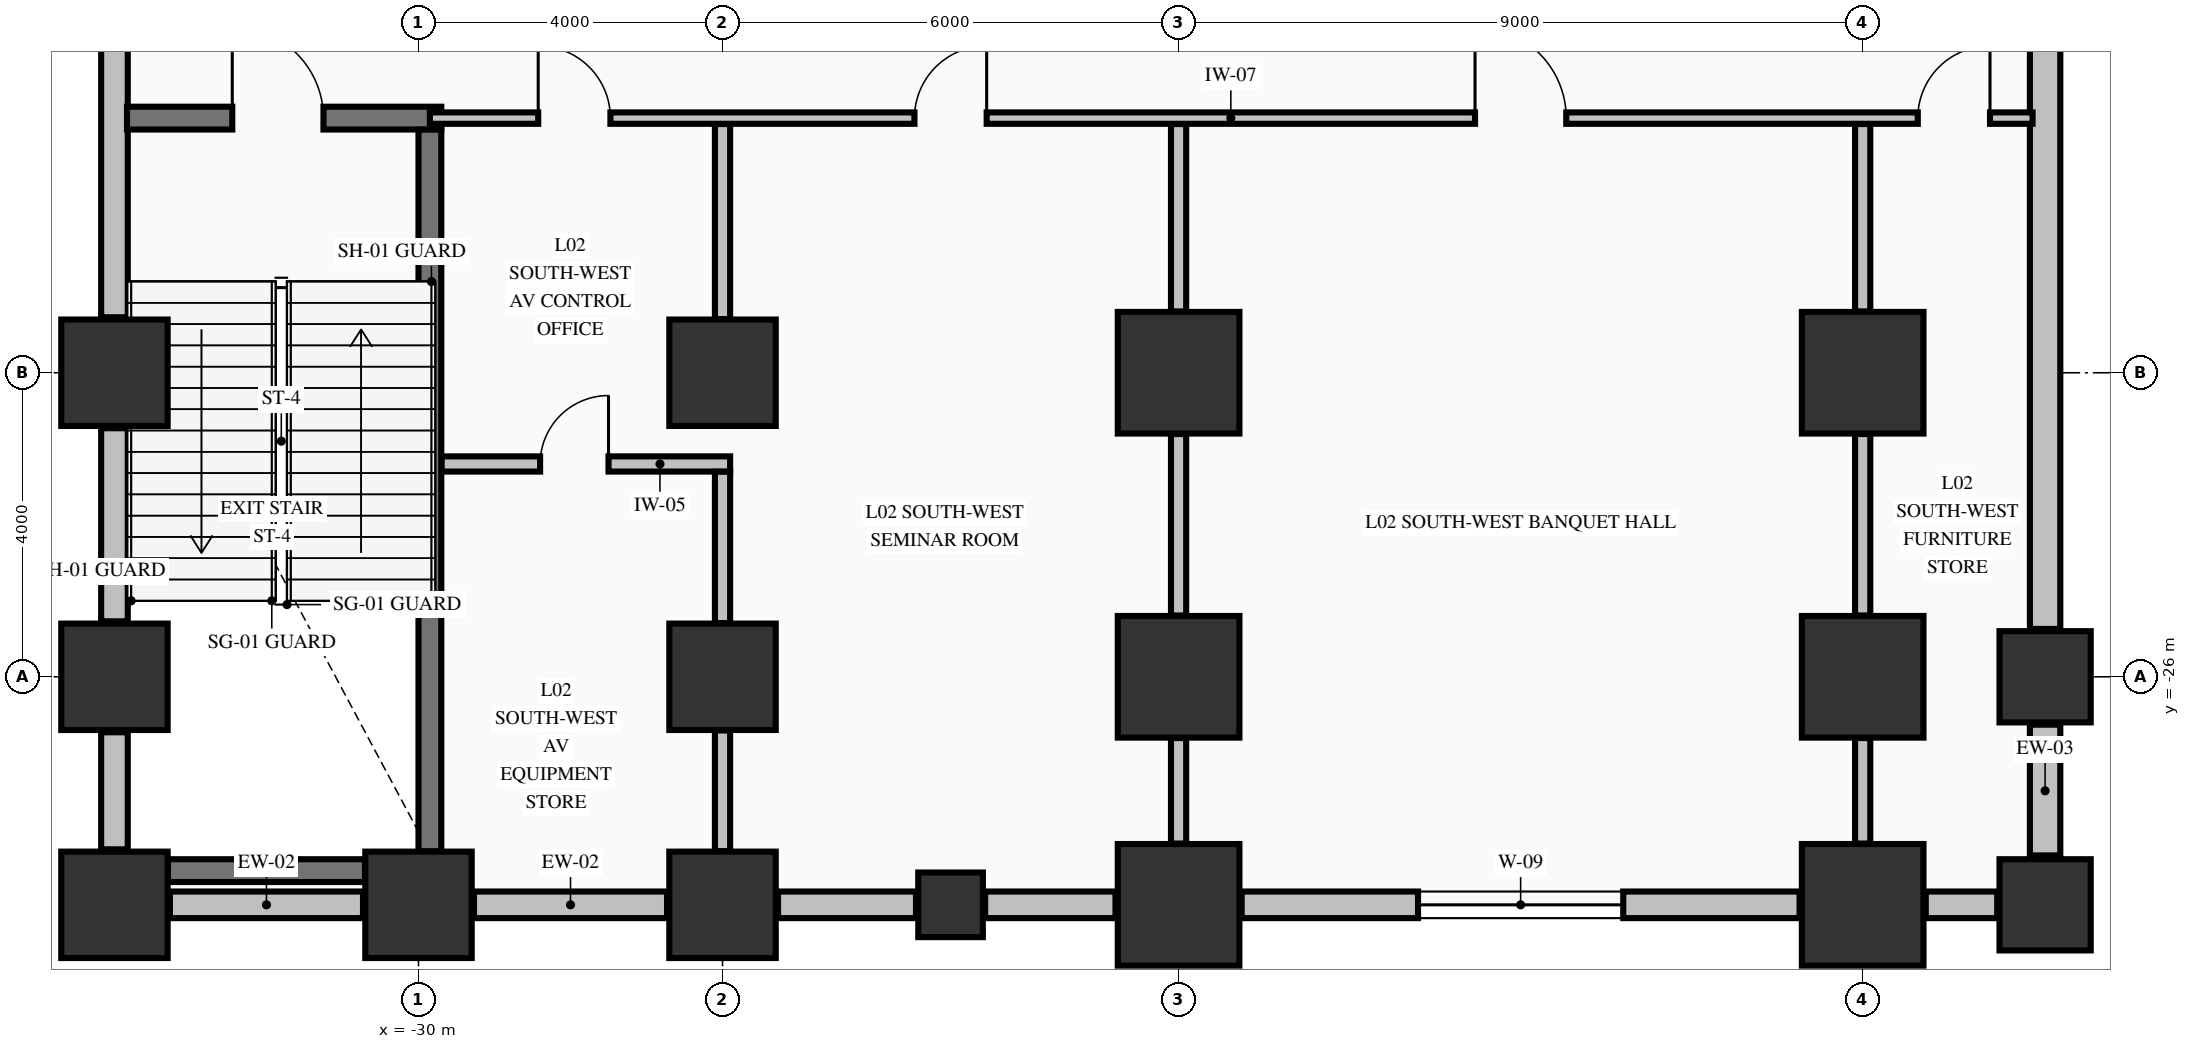
"""IFC4 building model, lengths in metres.
Left out: names, types, materials, properties, quantities, classifications, styles, units other than length and angle.
Written with IfcOpenShell. Run it as: python <this file> out.ifc"""

import sys

from ifc_helpers import new_model, si_unit, direction, frame, frame_2d, origin, origin_2d, place, context, subcontext, project, spatial, rectangle, extrude, element, fill, save


model = new_model("IFC4")
c1 = context("Model", 3, precision=1e-05, world=origin(), true_north=direction((0.0, 1.0)))
c2 = subcontext(c1, "Body", "Model", "MODEL_VIEW")
j1 = project(units=[si_unit("LENGTHUNIT", "METRE"), si_unit("PLANEANGLEUNIT", "RADIAN")], contexts=[c1])
p1 = place(None, origin())
s1 = spatial("IfcSite", under=j1, at=p1, CompositionType="ELEMENT")
p2 = place(p1, origin())
s2 = spatial("IfcBuilding", under=s1, at=p2, CompositionType="ELEMENT")
p3 = place(p2, frame((0.0, 0.0, 10.88)))
s3 = spatial("IfcBuildingStorey", under=s2, at=p3, CompositionType="ELEMENT", Elevation=10.88)
for number, where, z_axis, x_axis in (
    (1, (-34.0, -29.0, 0.0), (0.0, 0.0, 1.0), (1.0, 0.0, 0.0)),
    (2, (-34.0, -26.0, 0.0), (0.0, 0.0, 1.0), (1.0, 0.0, 0.0)),
    (3, (-34.0, -22.0, 0.0), (0.0, 0.0, 1.0), (1.0, 0.0, 0.0)),
    (4, (-30.0, -29.0, 0.0), (0.0, 0.0, 1.0), (1.0, 0.0, 0.0)),
    (5, (-26.0, -29.0, 0.0), (0.0, 0.0, 1.0), (1.0, 0.0, 0.0)),
    (6, (-26.0, -26.0, 0.0), (0.0, 0.0, 1.0), (1.0, 0.0, 0.0)),
    (7, (-26.0, -22.0, 0.0), (0.0, 0.0, 1.0), (1.0, 0.0, 0.0)),
):
    element("IfcColumn", number, at=place(p3, frame(where, z_axis=z_axis, x_axis=x_axis)), inside=s3, PredefinedType="COLUMN", context=c2, shape_type="SweptSolid", body=[
        extrude(rectangle(XDim=1.4, YDim=1.4, at=origin_2d()), origin(), (0.0, 0.0, 1.0), 5.09),
    ])
for number, where, z_axis, x_axis in (
    (8, (-20.0, -29.0, 0.0), (0.0, 0.0, 1.0), (1.0, 0.0, 0.0)),
    (9, (-20.0, -26.0, 0.0), (0.0, 0.0, 1.0), (1.0, 0.0, 0.0)),
    (10, (-20.0, -22.0, 0.0), (0.0, 0.0, 1.0), (1.0, 0.0, 0.0)),
    (11, (-11.0, -29.0, 0.0), (0.0, 0.0, 1.0), (1.0, 0.0, 0.0)),
    (12, (-11.0, -26.0, 0.0), (0.0, 0.0, 1.0), (1.0, 0.0, 0.0)),
    (13, (-11.0, -22.0, 0.0), (0.0, 0.0, 1.0), (1.0, 0.0, 0.0)),
):
    element("IfcColumn", number, at=place(p3, frame(where, z_axis=z_axis, x_axis=x_axis)), inside=s3, PredefinedType="COLUMN", context=c2, shape_type="SweptSolid", body=[
        extrude(rectangle(XDim=1.6, YDim=1.6, at=origin_2d()), origin(), (0.0, 0.0, 1.0), 5.09),
    ])
for number, where, z_axis, x_axis in (
    (14, (-8.6, -29.0, 0.0), (0.0, 0.0, 1.0), (1.0, 0.0, 0.0)),
    (15, (-8.6, -26.0, 0.0), (0.0, 0.0, 1.0), (1.0, 0.0, 0.0)),
):
    element("IfcColumn", number, at=place(p3, frame(where, z_axis=z_axis, x_axis=x_axis)), inside=s3, PredefinedType="COLUMN", context=c2, shape_type="SweptSolid", body=[
        extrude(rectangle(XDim=1.2, YDim=1.2, at=origin_2d()), origin(), (0.0, 0.0, 1.0), 5.09),
    ])
p4 = place(p3, frame((-23.0, -29.0, 0.0), z_axis=(0.0, 0.0, 1.0), x_axis=(1.0, 0.0, 0.0)))
e16 = element("IfcColumn", 16, at=p4, inside=s3, PredefinedType="PILASTER", context=c2, shape_type="SweptSolid", body=[
    extrude(rectangle(XDim=0.85, YDim=0.85, at=origin_2d()), origin(), (0.0, 0.0, 1.0), 5.09),
])
for number, where, z_axis, x_axis in (
    (17, (-33.27, -29.0, 0.0), (0.0, 0.0, 1.0), (1.0, 0.0, 0.0)),
    (18, (-29.27, -29.0, 0.0), (0.0, 0.0, 1.0), (1.0, 0.0, 0.0)),
):
    element("IfcWall", number, at=place(p3, frame(where, z_axis=z_axis, x_axis=x_axis)), inside=s3, PredefinedType="STANDARD", context=c2, shape_type="SweptSolid", body=[
        extrude(rectangle(XDim=2.54, YDim=0.35, at=frame_2d((1.27, 0.0))), origin(), (0.0, 0.0, 1.0), 4.482),
    ])
p5 = place(p3, frame((-25.27, -29.0, 0.0), z_axis=(0.0, 0.0, 1.0), x_axis=(1.0, 0.0, 0.0)))
e19 = element("IfcWall", 19, at=p5, inside=s3, PredefinedType="STANDARD", context=c2, shape_type="SweptSolid", body=[
    extrude(rectangle(XDim=1.815, YDim=0.35, at=frame_2d((0.907, 0.0))), origin(), (0.0, 0.0, 1.0), 4.482),
])
p6 = place(p3, frame((-22.545, -29.0, 0.0), z_axis=(0.0, 0.0, 1.0), x_axis=(1.0, 0.0, 0.0)))
e20 = element("IfcWall", 20, at=p6, inside=s3, PredefinedType="STANDARD", context=c2, shape_type="SweptSolid", body=[
    extrude(rectangle(XDim=1.715, YDim=0.35, at=frame_2d((0.857, 0.0))), origin(), (0.0, 0.0, 1.0), 4.482),
])
p7 = place(p3, frame((-19.17, -29.0, 0.0), z_axis=(0.0, 0.0, 1.0), x_axis=(1.0, 0.0, 0.0)))
e21 = element("IfcWall", 21, at=p7, inside=s3, PredefinedType="STANDARD", context=c2, shape_type="SweptSolid", body=[
    extrude(rectangle(XDim=7.34, YDim=0.35, at=frame_2d((3.67, 0.0))), origin(), (0.0, 0.0, 1.0), 4.482),
])
p8 = place(p7, frame((2.32, 0.0, 0.85)))
e22 = element("IfcOpeningElement", 22, at=p8, cuts=e21, PredefinedType="OPENING", context=c2, shape_type="SweptSolid", body=[
    extrude(rectangle(XDim=2.7, YDim=2.05, at=frame_2d((1.35, 1.025))), frame((0.0, 0.185, 0.0), z_axis=(0.0, -1.0, 0.0), x_axis=(1.0, 0.0, 0.0)), (0.0, 0.0, 1.0), 0.37),
])
p9 = place(p3, frame((-10.17, -29.0, 0.0), z_axis=(0.0, 0.0, 1.0), x_axis=(1.0, 0.0, 0.0)))
e23 = element("IfcWall", 23, at=p9, inside=s3, PredefinedType="STANDARD", context=c2, shape_type="SweptSolid", body=[
    extrude(rectangle(XDim=0.94, YDim=0.35, at=frame_2d((0.47, 0.0))), origin(), (0.0, 0.0, 1.0), 4.482),
])
p10 = place(p3, frame((-34.0, -28.27, 0.0), z_axis=(0.0, 0.0, 1.0), x_axis=(0.0, 1.0, 0.0)))
e24 = element("IfcWall", 24, at=p10, inside=s3, PredefinedType="STANDARD", context=c2, shape_type="SweptSolid", body=[
    extrude(rectangle(XDim=1.54, YDim=0.35, at=frame_2d((0.77, 0.0))), origin(), (0.0, 0.0, 1.0), 5.09),
])
p11 = place(p3, frame((-34.0, -25.27, 0.0), z_axis=(0.0, 0.0, 1.0), x_axis=(0.0, 1.0, 0.0)))
e25 = element("IfcWall", 25, at=p11, inside=s3, PredefinedType="STANDARD", context=c2, shape_type="SweptSolid", body=[
    extrude(rectangle(XDim=2.54, YDim=0.35, at=frame_2d((1.27, 0.0))), origin(), (0.0, 0.0, 1.0), 5.09),
])
p12 = place(p3, frame((-34.0, -21.27, 0.0), z_axis=(0.0, 0.0, 1.0), x_axis=(0.0, 1.0, 0.0)))
e26 = element("IfcWall", 26, at=p12, inside=s3, PredefinedType="STANDARD", context=c2, shape_type="SweptSolid", body=[
    extrude(rectangle(XDim=4.54, YDim=0.35, at=frame_2d((2.27, 0.0))), origin(), (0.0, 0.0, 1.0), 5.09),
])
p13 = place(p3, frame((-8.6, -28.35, 0.0), z_axis=(0.0, 0.0, 1.0), x_axis=(0.0, 1.0, 0.0)))
e27 = element("IfcWall", 27, at=p13, inside=s3, PredefinedType="STANDARD", context=c2, shape_type="SweptSolid", body=[
    extrude(rectangle(XDim=1.72, YDim=0.4, at=frame_2d((0.86, 0.0))), origin(), (0.0, 0.0, 1.0), 4.132),
])
p14 = place(p3, frame((-8.6, -25.37, 0.0), z_axis=(0.0, 0.0, 1.0), x_axis=(0.0, 1.0, 0.0)))
e28 = element("IfcWall", 28, at=p14, inside=s3, PredefinedType="STANDARD", context=c2, shape_type="SweptSolid", body=[
    extrude(rectangle(XDim=24.72, YDim=0.4, at=frame_2d((12.36, 0.0))), origin(), (0.0, 0.0, 1.0), 4.132),
])
p15 = place(p3, frame((-33.296, -28.55, 0.0), z_axis=(0.0, 0.0, 1.0), x_axis=(1.0, 0.0, 0.0)))
e29 = element("IfcWall", 29, at=p15, inside=s3, PredefinedType="SHEAR", context=c2, shape_type="SweptSolid", body=[
    extrude(rectangle(XDim=2.592, YDim=0.3, at=frame_2d((1.296, 0.0))), origin(), (0.0, 0.0, 1.0), 5.09),
])
p16 = place(p3, frame((-33.835, -18.65, 0.0), z_axis=(0.0, 0.0, 1.0), x_axis=(1.0, 0.0, 0.0)))
e30 = element("IfcWall", 30, at=p16, inside=s3, PredefinedType="SHEAR", context=c2, shape_type="SweptSolid", body=[
    extrude(rectangle(XDim=4.135, YDim=0.3, at=frame_2d((2.067, 0.0))), origin(), (0.0, 0.0, 1.0), 5.09),
])
p17 = place(p16, frame((1.385, 0.0, 0.0)))
e31 = element("IfcOpeningElement", 31, at=p17, cuts=e30, PredefinedType="OPENING", context=c2, shape_type="SweptSolid", body=[
    extrude(rectangle(XDim=1.2, YDim=2.15, at=frame_2d((0.6, 1.075))), frame((0.0, 0.16, 0.0), z_axis=(0.0, -1.0, 0.0), x_axis=(1.0, 0.0, 0.0)), (0.0, 0.0, 1.0), 0.32),
])
p18 = place(p3, frame((-29.697, -23.2, 0.0), z_axis=(0.0, 0.0, 1.0), x_axis=(1.0, 0.0, 0.0)))
e32 = element("IfcWall", 32, at=p18, inside=s3, PredefinedType="PARTITIONING", context=c2, shape_type="SweptSolid", body=[
    extrude(rectangle(XDim=3.797, YDim=0.2, at=frame_2d((1.898, 0.0))), origin(), (0.0, 0.0, 1.0), 5.09),
])
p19 = place(p18, frame((1.297, 0.0, 0.0)))
e33 = element("IfcOpeningElement", 33, at=p19, cuts=e32, PredefinedType="OPENING", context=c2, shape_type="SweptSolid", body=[
    extrude(rectangle(XDim=0.9, YDim=2.15, at=frame_2d((0.45, 1.075))), frame((0.0, 0.11, 0.0), z_axis=(0.0, -1.0, 0.0), x_axis=(1.0, 0.0, 0.0)), (0.0, 0.0, 1.0), 0.22),
])
p20 = place(p3, frame((-29.85, -18.65, 0.0), z_axis=(0.0, 0.0, 1.0), x_axis=(1.0, 0.0, 0.0)))
e34 = element("IfcWall", 34, at=p20, inside=s3, PredefinedType="PARTITIONING", context=c2, shape_type="SweptSolid", body=[
    extrude(rectangle(XDim=21.085, YDim=0.15, at=frame_2d((10.542, 0.0))), origin(), (0.0, 0.0, 1.0), 5.09),
])
p21 = place(p20, frame((1.425, 0.0, 0.0)))
e35 = element("IfcOpeningElement", 35, at=p21, cuts=e34, PredefinedType="OPENING", context=c2, shape_type="SweptSolid", body=[
    extrude(rectangle(XDim=0.95, YDim=2.15, at=frame_2d((0.475, 1.075))), frame((0.0, 0.085, 0.0), z_axis=(0.0, -1.0, 0.0), x_axis=(1.0, 0.0, 0.0)), (0.0, 0.0, 1.0), 0.17),
])
p22 = place(p20, frame((6.375, 0.0, 0.0)))
e36 = element("IfcOpeningElement", 36, at=p22, cuts=e34, PredefinedType="OPENING", context=c2, shape_type="SweptSolid", body=[
    extrude(rectangle(XDim=0.95, YDim=2.15, at=frame_2d((0.475, 1.075))), frame((0.0, 0.085, 0.0), z_axis=(0.0, -1.0, 0.0), x_axis=(1.0, 0.0, 0.0)), (0.0, 0.0, 1.0), 0.17),
])
p23 = place(p20, frame((13.75, 0.0, 0.0)))
e37 = element("IfcOpeningElement", 37, at=p23, cuts=e34, PredefinedType="OPENING", context=c2, shape_type="SweptSolid", body=[
    extrude(rectangle(XDim=1.2, YDim=2.15, at=frame_2d((0.6, 1.075))), frame((0.0, 0.085, 0.0), z_axis=(0.0, -1.0, 0.0), x_axis=(1.0, 0.0, 0.0)), (0.0, 0.0, 1.0), 0.17),
])
p24 = place(p20, frame((19.575, 0.0, 0.0)))
e38 = element("IfcOpeningElement", 38, at=p24, cuts=e34, PredefinedType="OPENING", context=c2, shape_type="SweptSolid", body=[
    extrude(rectangle(XDim=0.95, YDim=2.15, at=frame_2d((0.475, 1.075))), frame((0.0, 0.085, 0.0), z_axis=(0.0, -1.0, 0.0), x_axis=(1.0, 0.0, 0.0)), (0.0, 0.0, 1.0), 0.17),
])
p25 = place(p3, frame((-29.85, -28.296, 0.0), z_axis=(0.0, 0.0, 1.0), x_axis=(0.0, 1.0, 0.0)))
e39 = element("IfcWall", 39, at=p25, inside=s3, PredefinedType="SHEAR", context=c2, shape_type="SweptSolid", body=[
    extrude(rectangle(XDim=9.494, YDim=0.3, at=frame_2d((4.747, 0.0))), origin(), (0.0, 0.0, 1.0), 5.09),
])
p26 = place(p3, frame((-26.0, -28.294, 0.0), z_axis=(0.0, 0.0, 1.0), x_axis=(0.0, 1.0, 0.0)))
e40 = element("IfcWall", 40, at=p26, inside=s3, PredefinedType="PARTITIONING", context=c2, shape_type="SweptSolid", body=[
    extrude(rectangle(XDim=1.588, YDim=0.2, at=frame_2d((0.794, 0.0))), origin(), (0.0, 0.0, 1.0), 4.132),
])
p27 = place(p3, frame((-26.0, -25.294, 0.0), z_axis=(0.0, 0.0, 1.0), x_axis=(0.0, 1.0, 0.0)))
e41 = element("IfcWall", 41, at=p27, inside=s3, PredefinedType="PARTITIONING", context=c2, shape_type="SweptSolid", body=[
    extrude(rectangle(XDim=1.991, YDim=0.2, at=frame_2d((0.996, 0.0))), origin(), (0.0, 0.0, 1.0), 4.132),
])
p28 = place(p3, frame((-26.0, -21.294, 0.0), z_axis=(0.0, 0.0, 1.0), x_axis=(0.0, 1.0, 0.0)))
e42 = element("IfcWall", 42, at=p28, inside=s3, PredefinedType="PARTITIONING", context=c2, shape_type="SweptSolid", body=[
    extrude(rectangle(XDim=2.566, YDim=0.2, at=frame_2d((1.283, 0.0))), origin(), (0.0, 0.0, 1.0), 4.132),
])
p29 = place(p3, frame((-20.0, -28.194, 0.0), z_axis=(0.0, 0.0, 1.0), x_axis=(0.0, 1.0, 0.0)))
e43 = element("IfcWall", 43, at=p29, inside=s3, PredefinedType="PARTITIONING", context=c2, shape_type="SweptSolid", body=[
    extrude(rectangle(XDim=1.388, YDim=0.2, at=frame_2d((0.694, 0.0))), origin(), (0.0, 0.0, 1.0), 4.132),
])
p30 = place(p3, frame((-20.0, -25.194, 0.0), z_axis=(0.0, 0.0, 1.0), x_axis=(0.0, 1.0, 0.0)))
e44 = element("IfcWall", 44, at=p30, inside=s3, PredefinedType="PARTITIONING", context=c2, shape_type="SweptSolid", body=[
    extrude(rectangle(XDim=2.388, YDim=0.2, at=frame_2d((1.194, 0.0))), origin(), (0.0, 0.0, 1.0), 4.132),
])
p31 = place(p3, frame((-20.0, -21.194, 0.0), z_axis=(0.0, 0.0, 1.0), x_axis=(0.0, 1.0, 0.0)))
e45 = element("IfcWall", 45, at=p31, inside=s3, PredefinedType="PARTITIONING", context=c2, shape_type="SweptSolid", body=[
    extrude(rectangle(XDim=2.466, YDim=0.2, at=frame_2d((1.233, 0.0))), origin(), (0.0, 0.0, 1.0), 4.132),
])
p32 = place(p3, frame((-11.0, -28.194, 0.0), z_axis=(0.0, 0.0, 1.0), x_axis=(0.0, 1.0, 0.0)))
e46 = element("IfcWall", 46, at=p32, inside=s3, PredefinedType="PARTITIONING", context=c2, shape_type="SweptSolid", body=[
    extrude(rectangle(XDim=1.388, YDim=0.2, at=frame_2d((0.694, 0.0))), origin(), (0.0, 0.0, 1.0), 4.132),
])
p33 = place(p3, frame((-11.0, -25.194, 0.0), z_axis=(0.0, 0.0, 1.0), x_axis=(0.0, 1.0, 0.0)))
e47 = element("IfcWall", 47, at=p33, inside=s3, PredefinedType="PARTITIONING", context=c2, shape_type="SweptSolid", body=[
    extrude(rectangle(XDim=2.388, YDim=0.2, at=frame_2d((1.194, 0.0))), origin(), (0.0, 0.0, 1.0), 4.132),
])
p34 = place(p3, frame((-11.0, -21.194, 0.0), z_axis=(0.0, 0.0, 1.0), x_axis=(0.0, 1.0, 0.0)))
e48 = element("IfcWall", 48, at=p34, inside=s3, PredefinedType="PARTITIONING", context=c2, shape_type="SweptSolid", body=[
    extrude(rectangle(XDim=2.466, YDim=0.2, at=frame_2d((1.233, 0.0))), origin(), (0.0, 0.0, 1.0), 4.132),
])
p35 = place(p8, origin())
e49 = element("IfcWindow", 49, at=p35, inside=s3, PartitioningType="SINGLE_PANEL", PredefinedType="WINDOW", context=c2, shape_type="SweptSolid", body=[
    extrude(rectangle(XDim=2.7, YDim=2.05, at=frame_2d((1.35, 1.025))), frame((0.0, 0.03, 0.0), z_axis=(0.0, -1.0, 0.0), x_axis=(1.0, 0.0, 0.0)), (0.0, 0.0, 1.0), 0.06),
])
fill(e22, e49)
p36 = place(p17, origin())
e50 = element("IfcDoor", 50, at=p36, inside=s3, OperationType="SINGLE_SWING_LEFT", PredefinedType="DOOR", context=c2, shape_type="SweptSolid", body=[
    extrude(rectangle(XDim=1.2, YDim=2.15, at=frame_2d((0.6, 1.075))), frame((0.0, 0.025, 0.0), z_axis=(0.0, -1.0, 0.0), x_axis=(1.0, 0.0, 0.0)), (0.0, 0.0, 1.0), 0.05),
])
fill(e31, e50)
p37 = place(p19, origin())
e51 = element("IfcDoor", 51, at=p37, inside=s3, OperationType="SINGLE_SWING_RIGHT", PredefinedType="DOOR", context=c2, shape_type="SweptSolid", body=[
    extrude(rectangle(XDim=0.9, YDim=2.15, at=frame_2d((0.45, 1.075))), frame((0.0, 0.025, 0.0), z_axis=(0.0, -1.0, 0.0), x_axis=(1.0, 0.0, 0.0)), (0.0, 0.0, 1.0), 0.05),
])
fill(e33, e51)
p38 = place(p21, origin())
e52 = element("IfcDoor", 52, at=p38, inside=s3, OperationType="SINGLE_SWING_LEFT", PredefinedType="DOOR", context=c2, shape_type="SweptSolid", body=[
    extrude(rectangle(XDim=0.95, YDim=2.15, at=frame_2d((0.475, 1.075))), frame((0.0, 0.025, 0.0), z_axis=(0.0, -1.0, 0.0), x_axis=(1.0, 0.0, 0.0)), (0.0, 0.0, 1.0), 0.05),
])
fill(e35, e52)
p39 = place(p22, origin())
e53 = element("IfcDoor", 53, at=p39, inside=s3, OperationType="SINGLE_SWING_RIGHT", PredefinedType="DOOR", context=c2, shape_type="SweptSolid", body=[
    extrude(rectangle(XDim=0.95, YDim=2.15, at=frame_2d((0.475, 1.075))), frame((0.0, 0.025, 0.0), z_axis=(0.0, -1.0, 0.0), x_axis=(1.0, 0.0, 0.0)), (0.0, 0.0, 1.0), 0.05),
])
fill(e36, e53)
p40 = place(p23, origin())
e54 = element("IfcDoor", 54, at=p40, inside=s3, OperationType="SINGLE_SWING_LEFT", PredefinedType="DOOR", context=c2, shape_type="SweptSolid", body=[
    extrude(rectangle(XDim=1.2, YDim=2.15, at=frame_2d((0.6, 1.075))), frame((0.0, 0.025, 0.0), z_axis=(0.0, -1.0, 0.0), x_axis=(1.0, 0.0, 0.0)), (0.0, 0.0, 1.0), 0.05),
])
fill(e37, e54)
p41 = place(p24, origin())
e55 = element("IfcDoor", 55, at=p41, inside=s3, OperationType="SINGLE_SWING_RIGHT", PredefinedType="DOOR", context=c2, shape_type="SweptSolid", body=[
    extrude(rectangle(XDim=0.95, YDim=2.15, at=frame_2d((0.475, 1.075))), frame((0.0, 0.025, 0.0), z_axis=(0.0, -1.0, 0.0), x_axis=(1.0, 0.0, 0.0)), (0.0, 0.0, 1.0), 0.05),
])
fill(e38, e55)
save(model, sys.argv[1])
